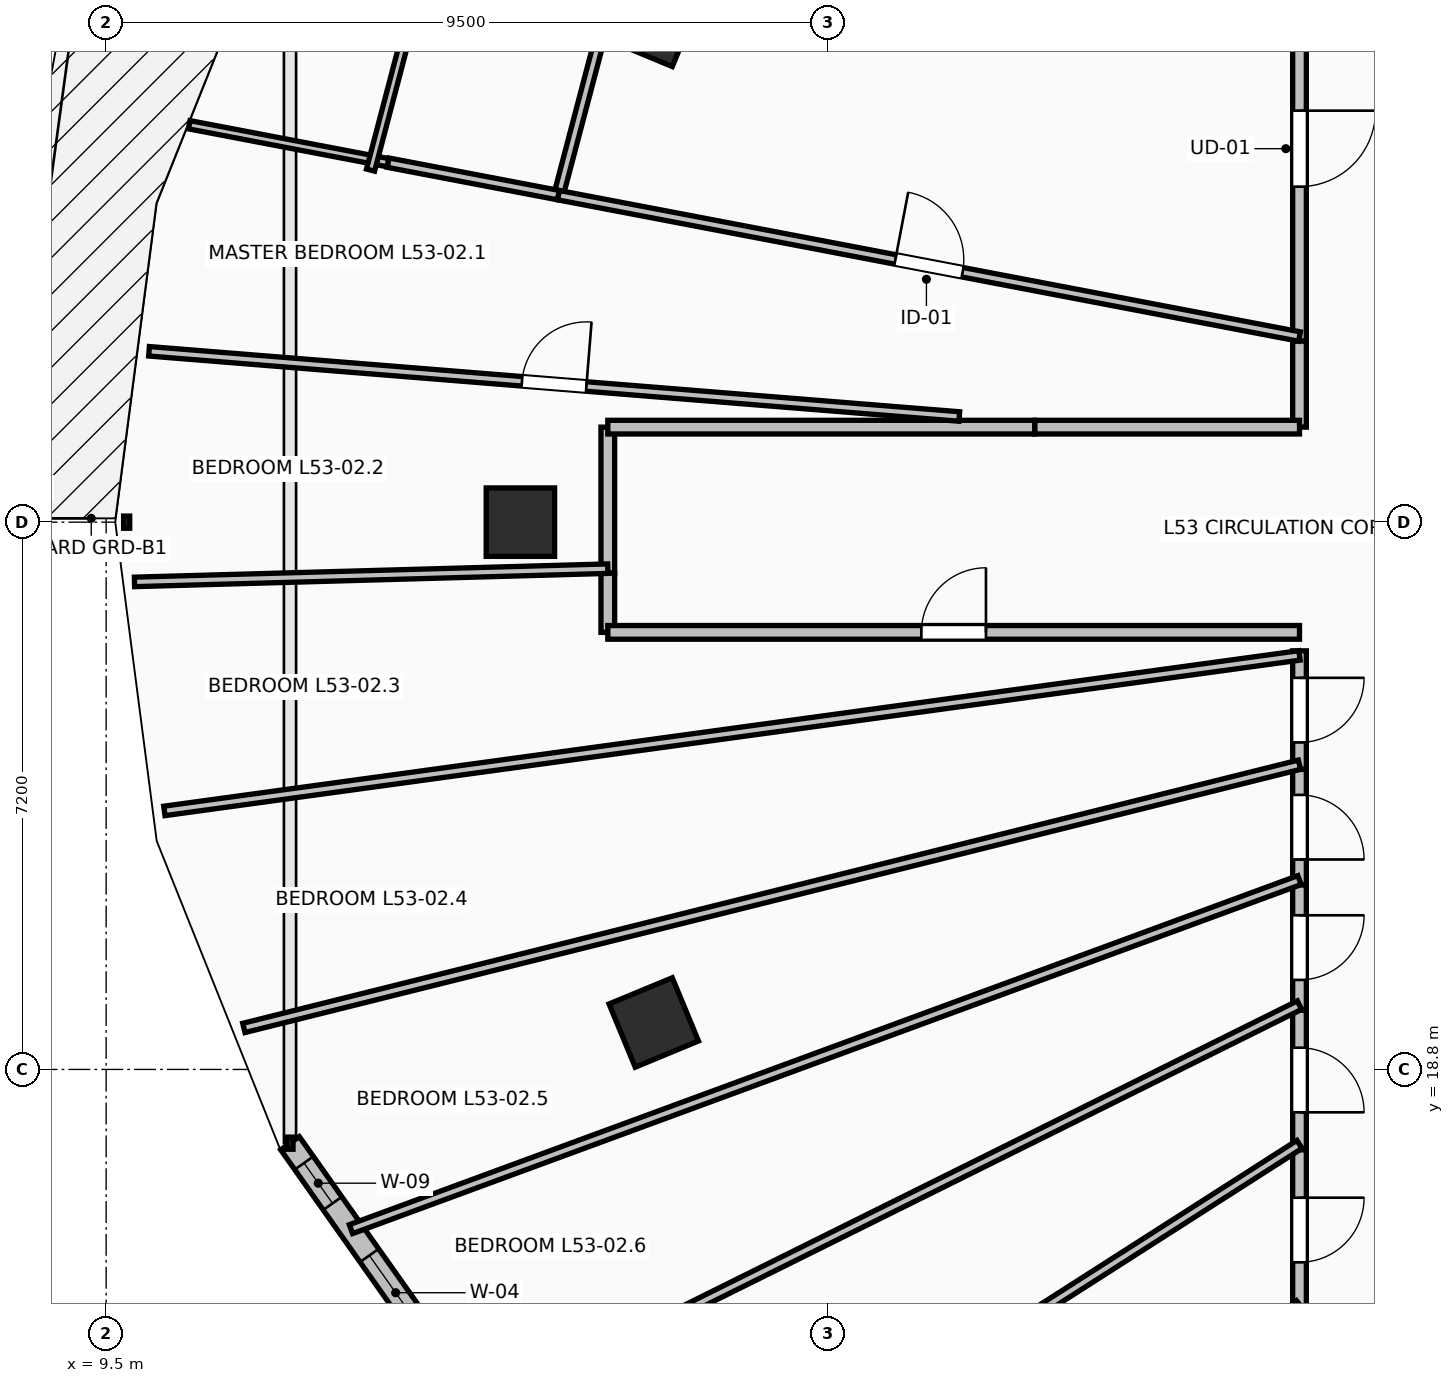
"""IFC4 building model, lengths in metres.
Left out: names, types, materials, properties, quantities, classifications, styles, units other than length and angle.
Written with IfcOpenShell. Run it as: python <this file> out.ifc"""

import sys

from ifc_helpers import new_model, si_unit, direction, frame, frame_2d, origin, origin_2d, place, context, subcontext, project, spatial, rectangle, extrude, element, fill, save


model = new_model("IFC4")
c1 = context("Model", 3, precision=1e-05, world=origin(), true_north=direction((0.0, 1.0)))
c2 = subcontext(c1, "Body", "Model", "MODEL_VIEW")
j1 = project(units=[si_unit("LENGTHUNIT", "METRE"), si_unit("PLANEANGLEUNIT", "RADIAN")], contexts=[c1])
p1 = place(None, origin())
s1 = spatial("IfcSite", under=j1, at=p1, CompositionType="ELEMENT")
p2 = place(p1, origin())
s2 = spatial("IfcBuilding", under=s1, at=p2, CompositionType="ELEMENT")
p3 = place(p2, frame((0.0, 0.0, 196.6)))
s3 = spatial("IfcBuildingStorey", under=s2, at=p3, CompositionType="ELEMENT", Elevation=196.6)
for number, where, z_axis, x_axis in (
    (1, (16.705, 32.582, 0.0), (0.0, 0.0, 1.0), (-0.924, 0.383, 0.0)),
    (2, (14.95, 26.0, 0.0), (0.0, 0.0, 1.0), (-1.0, 0.0, 0.0)),
    (3, (16.705, 19.418, 0.0), (0.0, 0.0, 1.0), (-0.924, -0.383, 0.0)),
):
    element("IfcColumn", number, at=place(p3, frame(where, z_axis=z_axis, x_axis=x_axis)), inside=s3, PredefinedType="COLUMN", context=c2, shape_type="SweptSolid", body=[
        extrude(rectangle(XDim=0.9, YDim=0.9, at=origin_2d()), origin(), (0.0, 0.0, 1.0), 3.5),
    ])
p4 = place(p3, frame((11.919, 17.83, 0.0), z_axis=(0.0, 0.0, 1.0), x_axis=(0.577168747264, -0.81662490605, 0.0)))
e4 = element("IfcWall", 4, at=p4, inside=s3, PredefinedType="STANDARD", context=c2, shape_type="SweptSolid", body=[
    extrude(rectangle(XDim=4.52, YDim=0.3, at=frame_2d((2.26, 0.0))), origin(), (0.0, 0.0, 1.0), 3.24),
])
p5 = place(p4, frame((0.32, 0.0, 0.85)))
e5 = element("IfcOpeningElement", 5, at=p5, cuts=e4, PredefinedType="OPENING", context=c2, shape_type="SweptSolid", body=[
    extrude(rectangle(XDim=0.65, YDim=1.8, at=frame_2d((0.325, 0.9))), frame((0.0, 0.165, 0.0), z_axis=(0.0, -1.0, 0.0), x_axis=(1.0, 0.0, 0.0)), (0.0, 0.0, 1.0), 0.33),
])
p6 = place(p4, frame((1.809, 0.0, 0.85)))
e6 = element("IfcOpeningElement", 6, at=p6, cuts=e4, PredefinedType="OPENING", context=c2, shape_type="SweptSolid", body=[
    extrude(rectangle(XDim=1.2, YDim=1.95, at=frame_2d((0.6, 0.975))), frame((0.0, 0.165, 0.0), z_axis=(0.0, -1.0, 0.0), x_axis=(1.0, 0.0, 0.0)), (0.0, 0.0, 1.0), 0.33),
])
p7 = place(p3, frame((25.2, 33.445, 0.0), z_axis=(0.0, 0.0, 1.0), x_axis=(0.0, -1.0, 0.0)))
e7 = element("IfcWall", 7, at=p7, inside=s3, PredefinedType="PARTITIONING", context=c2, shape_type="SweptSolid", body=[
    extrude(rectangle(XDim=5.063, YDim=0.18, at=frame_2d((2.531, 0.0))), origin(), (0.0, 0.0, 1.0), 2.432),
])
p8 = place(p7, frame((2.031, 0.0, 0.0)))
e8 = element("IfcOpeningElement", 8, at=p8, cuts=e7, PredefinedType="OPENING", context=c2, shape_type="SweptSolid", body=[
    extrude(rectangle(XDim=1.0, YDim=2.15, at=frame_2d((0.5, 1.075))), frame((0.0, 0.105, 0.0), z_axis=(0.0, -1.0, 0.0), x_axis=(1.0, 0.0, 0.0)), (0.0, 0.0, 1.0), 0.21),
])
p9 = place(p3, frame((25.2, 28.382, 0.0), z_axis=(0.0, 0.0, 1.0), x_axis=(0.0, -1.0, 0.0)))
e9 = element("IfcWall", 9, at=p9, inside=s3, PredefinedType="PARTITIONING", context=c2, shape_type="SweptSolid", body=[
    extrude(rectangle(XDim=1.132, YDim=0.18, at=frame_2d((0.566, 0.0))), origin(), (0.0, 0.0, 1.0), 2.432),
])
p10 = place(p3, frame((25.2, 27.25, 0.0), z_axis=(0.0, 0.0, 1.0), x_axis=(-1.0, 0.0, 0.0)))
e10 = element("IfcWall", 10, at=p10, inside=s3, PredefinedType="PARTITIONING", context=c2, shape_type="SweptSolid", body=[
    extrude(rectangle(XDim=3.484, YDim=0.18, at=frame_2d((1.742, 0.0))), origin(), (0.0, 0.0, 1.0), 2.432),
])
p11 = place(p3, frame((16.1, 27.25, 0.0), z_axis=(0.0, 0.0, 1.0), x_axis=(0.0, -1.0, 0.0)))
e11 = element("IfcWall", 11, at=p11, inside=s3, PredefinedType="PARTITIONING", context=c2, shape_type="SweptSolid", body=[
    extrude(rectangle(XDim=1.922, YDim=0.18, at=frame_2d((0.961, 0.0))), origin(), (0.0, 0.0, 1.0), 2.432),
])
p12 = place(p3, frame((21.716, 27.25, 0.0), z_axis=(0.0, 0.0, 1.0), x_axis=(-1.0, 0.0, 0.0)))
e12 = element("IfcWall", 12, at=p12, inside=s3, PredefinedType="PARTITIONING", context=c2, shape_type="SweptSolid", body=[
    extrude(rectangle(XDim=5.616, YDim=0.18, at=frame_2d((2.808, 0.0))), origin(), (0.0, 0.0, 1.0), 2.432),
])
p13 = place(p3, frame((16.1, 25.328, 0.0), z_axis=(0.0, 0.0, 1.0), x_axis=(0.0, -1.0, 0.0)))
e13 = element("IfcWall", 13, at=p13, inside=s3, PredefinedType="PARTITIONING", context=c2, shape_type="SweptSolid", body=[
    extrude(rectangle(XDim=0.778, YDim=0.18, at=frame_2d((0.389, 0.0))), origin(), (0.0, 0.0, 1.0), 3.24),
])
p14 = place(p3, frame((16.1, 24.55, 0.0), z_axis=(0.0, 0.0, 1.0), x_axis=(1.0, 0.0, 0.0)))
e14 = element("IfcWall", 14, at=p14, inside=s3, PredefinedType="PARTITIONING", context=c2, shape_type="SweptSolid", body=[
    extrude(rectangle(XDim=9.1, YDim=0.18, at=frame_2d((4.55, 0.0))), origin(), (0.0, 0.0, 1.0), 2.922),
])
p15 = place(p14, frame((4.125, 0.0, 0.0)))
e15 = element("IfcOpeningElement", 15, at=p15, cuts=e14, PredefinedType="OPENING", context=c2, shape_type="SweptSolid", body=[
    extrude(rectangle(XDim=0.85, YDim=2.1, at=frame_2d((0.425, 1.05))), frame((0.0, 0.105, 0.0), z_axis=(0.0, -1.0, 0.0), x_axis=(1.0, 0.0, 0.0)), (0.0, 0.0, 1.0), 0.21),
])
p16 = place(p3, frame((25.2, 24.307, 0.0), z_axis=(0.0, 0.0, 1.0), x_axis=(0.0, -1.0, 0.0)))
e16 = element("IfcWall", 16, at=p16, inside=s3, PredefinedType="PARTITIONING", context=c2, shape_type="SweptSolid", body=[
    extrude(rectangle(XDim=1.56, YDim=0.18, at=frame_2d((0.78, 0.0))), origin(), (0.0, 0.0, 1.0), 3.24),
])
p17 = place(p16, frame((0.355, 0.0, 0.0)))
e17 = element("IfcOpeningElement", 17, at=p17, cuts=e16, PredefinedType="OPENING", context=c2, shape_type="SweptSolid", body=[
    extrude(rectangle(XDim=0.85, YDim=2.1, at=frame_2d((0.425, 1.05))), frame((0.0, 0.105, 0.0), z_axis=(0.0, -1.0, 0.0), x_axis=(1.0, 0.0, 0.0)), (0.0, 0.0, 1.0), 0.21),
])
p18 = place(p3, frame((25.2, 22.747, 0.0), z_axis=(0.0, 0.0, 1.0), x_axis=(0.0, -1.0, 0.0)))
e18 = element("IfcWall", 18, at=p18, inside=s3, PredefinedType="PARTITIONING", context=c2, shape_type="SweptSolid", body=[
    extrude(rectangle(XDim=1.52, YDim=0.18, at=frame_2d((0.76, 0.0))), origin(), (0.0, 0.0, 1.0), 3.24),
])
p19 = place(p18, frame((0.335, 0.0, 0.0)))
e19 = element("IfcOpeningElement", 19, at=p19, cuts=e18, PredefinedType="OPENING", context=c2, shape_type="SweptSolid", body=[
    extrude(rectangle(XDim=0.85, YDim=2.1, at=frame_2d((0.425, 1.05))), frame((0.0, 0.105, 0.0), z_axis=(0.0, -1.0, 0.0), x_axis=(1.0, 0.0, 0.0)), (0.0, 0.0, 1.0), 0.21),
])
p20 = place(p3, frame((25.2, 21.227, 0.0), z_axis=(0.0, 0.0, 1.0), x_axis=(0.0, -1.0, 0.0)))
e20 = element("IfcWall", 20, at=p20, inside=s3, PredefinedType="PARTITIONING", context=c2, shape_type="SweptSolid", body=[
    extrude(rectangle(XDim=1.648, YDim=0.18, at=frame_2d((0.824, 0.0))), origin(), (0.0, 0.0, 1.0), 3.24),
])
p21 = place(p20, frame((0.399, 0.0, 0.0)))
e21 = element("IfcOpeningElement", 21, at=p21, cuts=e20, PredefinedType="OPENING", context=c2, shape_type="SweptSolid", body=[
    extrude(rectangle(XDim=0.85, YDim=2.1, at=frame_2d((0.425, 1.05))), frame((0.0, 0.105, 0.0), z_axis=(0.0, -1.0, 0.0), x_axis=(1.0, 0.0, 0.0)), (0.0, 0.0, 1.0), 0.21),
])
p22 = place(p3, frame((25.2, 19.579, 0.0), z_axis=(0.0, 0.0, 1.0), x_axis=(0.0, -1.0, 0.0)))
e22 = element("IfcWall", 22, at=p22, inside=s3, PredefinedType="PARTITIONING", context=c2, shape_type="SweptSolid", body=[
    extrude(rectangle(XDim=1.836, YDim=0.18, at=frame_2d((0.918, 0.0))), origin(), (0.0, 0.0, 1.0), 3.24),
])
p23 = place(p22, frame((0.493, 0.0, 0.0)))
e23 = element("IfcOpeningElement", 23, at=p23, cuts=e22, PredefinedType="OPENING", context=c2, shape_type="SweptSolid", body=[
    extrude(rectangle(XDim=0.85, YDim=2.1, at=frame_2d((0.425, 1.05))), frame((0.0, 0.105, 0.0), z_axis=(0.0, -1.0, 0.0), x_axis=(1.0, 0.0, 0.0)), (0.0, 0.0, 1.0), 0.21),
])
p24 = place(p3, frame((25.2, 17.743, 0.0), z_axis=(0.0, 0.0, 1.0), x_axis=(0.0, -1.0, 0.0)))
e24 = element("IfcWall", 24, at=p24, inside=s3, PredefinedType="PARTITIONING", context=c2, shape_type="SweptSolid", body=[
    extrude(rectangle(XDim=2.111, YDim=0.18, at=frame_2d((1.055, 0.0))), origin(), (0.0, 0.0, 1.0), 2.432),
])
p25 = place(p24, frame((0.631, 0.0, 0.0)))
e25 = element("IfcOpeningElement", 25, at=p25, cuts=e24, PredefinedType="OPENING", context=c2, shape_type="SweptSolid", body=[
    extrude(rectangle(XDim=0.85, YDim=2.1, at=frame_2d((0.425, 1.05))), frame((0.0, 0.105, 0.0), z_axis=(0.0, -1.0, 0.0), x_axis=(1.0, 0.0, 0.0)), (0.0, 0.0, 1.0), 0.21),
])
p26 = place(p3, frame((13.21, 30.729, 0.0), z_axis=(0.0, 0.0, 1.0), x_axis=(-0.982266305937, 0.187491077708, 0.0)))
e26 = element("IfcWall", 26, at=p26, inside=s3, PredefinedType="PARTITIONING", context=c2, shape_type="SweptSolid", body=[
    extrude(rectangle(XDim=2.664, YDim=0.11, at=frame_2d((1.332, 0.0))), origin(), (0.0, 0.0, 1.0), 3.24),
])
p27 = place(p3, frame((16.123, 32.853, 0.0), z_axis=(0.0, 0.0, 1.0), x_axis=(-0.254775717765, -0.967000172512, 0.0)))
e27 = element("IfcWall", 27, at=p27, inside=s3, PredefinedType="PARTITIONING", context=c2, shape_type="SweptSolid", body=[
    extrude(rectangle(XDim=2.638, YDim=0.125, at=frame_2d((1.319, 0.0))), origin(), (0.0, 0.0, 1.0), 3.24),
])
p28 = place(p3, frame((15.451, 30.302, 0.0), z_axis=(0.0, 0.0, 1.0), x_axis=(-0.982295439063, 0.187338384738, 0.0)))
e28 = element("IfcWall", 28, at=p28, inside=s3, PredefinedType="PARTITIONING", context=c2, shape_type="SweptSolid", body=[
    extrude(rectangle(XDim=2.281, YDim=0.125, at=frame_2d((1.14, 0.0))), origin(), (0.0, 0.0, 1.0), 3.24),
])
p29 = place(p3, frame((15.451, 30.302, 0.0), z_axis=(0.0, 0.0, 1.0), x_axis=(0.982284698783, -0.187394691859, 0.0)))
e29 = element("IfcWall", 29, at=p29, inside=s3, PredefinedType="PARTITIONING", context=c2, shape_type="SweptSolid", body=[
    extrude(rectangle(XDim=9.925, YDim=0.125, at=frame_2d((4.962, 0.0))), origin(), (0.0, 0.0, 1.0), 2.774),
])
p30 = place(p29, frame((4.512, 0.0, 0.0)))
e30 = element("IfcOpeningElement", 30, at=p30, cuts=e29, PredefinedType="OPENING", context=c2, shape_type="SweptSolid", body=[
    extrude(rectangle(XDim=0.9, YDim=2.1, at=frame_2d((0.45, 1.05))), frame((0.0, 0.077, 0.0), z_axis=(0.0, -1.0, 0.0), x_axis=(1.0, 0.0, 0.0)), (0.0, 0.0, 1.0), 0.155),
])
p31 = place(p3, frame((12.979, 30.632, 0.0), z_axis=(0.0, 0.0, 1.0), x_axis=(0.254121849718, 0.967172210879, 0.0)))
e31 = element("IfcWall", 31, at=p31, inside=s3, PredefinedType="PARTITIONING", context=c2, shape_type="SweptSolid", body=[
    extrude(rectangle(XDim=3.203, YDim=0.11, at=frame_2d((1.602, 0.0))), origin(), (0.0, 0.0, 1.0), 3.24),
])
p32 = place(p3, frame((10.064, 28.248, 0.0), z_axis=(0.0, 0.0, 1.0), x_axis=(0.996775744362, -0.080237867939, 0.0)))
e32 = element("IfcWall", 32, at=p32, inside=s3, PredefinedType="PARTITIONING", context=c2, shape_type="SweptSolid", body=[
    extrude(rectangle(XDim=10.695, YDim=0.125, at=frame_2d((5.348, 0.0))), origin(), (0.0, 0.0, 1.0), 2.774),
])
p33 = place(p32, frame((4.923, 0.0, 0.0)))
e33 = element("IfcOpeningElement", 33, at=p33, cuts=e32, PredefinedType="OPENING", context=c2, shape_type="SweptSolid", body=[
    extrude(rectangle(XDim=0.85, YDim=2.1, at=frame_2d((0.425, 1.05))), frame((0.0, 0.077, 0.0), z_axis=(0.0, -1.0, 0.0), x_axis=(1.0, 0.0, 0.0)), (0.0, 0.0, 1.0), 0.155),
])
p34 = place(p3, frame((9.873, 25.214, 0.0), z_axis=(0.0, 0.0, 1.0), x_axis=(0.999610603939, 0.027904130401, 0.0)))
e34 = element("IfcWall", 34, at=p34, inside=s3, PredefinedType="PARTITIONING", context=c2, shape_type="SweptSolid", body=[
    extrude(rectangle(XDim=6.229, YDim=0.125, at=frame_2d((3.115, 0.0))), origin(), (0.0, 0.0, 1.0), 2.774),
])
p35 = place(p3, frame((10.266, 22.201, 0.0), z_axis=(0.0, 0.0, 1.0), x_axis=(0.990743725495, 0.135745609106, 0.0)))
e35 = element("IfcWall", 35, at=p35, inside=s3, PredefinedType="PARTITIONING", context=c2, shape_type="SweptSolid", body=[
    extrude(rectangle(XDim=15.073, YDim=0.125, at=frame_2d((7.537, 0.0))), origin(), (0.0, 0.0, 1.0), 2.774),
])
p36 = place(p3, frame((11.312, 19.346, 0.0), z_axis=(0.0, 0.0, 1.0), x_axis=(0.970287811835, 0.241953636475, 0.0)))
e36 = element("IfcWall", 36, at=p36, inside=s3, PredefinedType="PARTITIONING", context=c2, shape_type="SweptSolid", body=[
    extrude(rectangle(XDim=14.313, YDim=0.125, at=frame_2d((7.157, 0.0))), origin(), (0.0, 0.0, 1.0), 2.774),
])
p37 = place(p3, frame((12.721, 16.699, 0.0), z_axis=(0.0, 0.0, 1.0), x_axis=(0.938476898763, 0.34534201958, 0.0)))
e37 = element("IfcWall", 37, at=p37, inside=s3, PredefinedType="PARTITIONING", context=c2, shape_type="SweptSolid", body=[
    extrude(rectangle(XDim=13.297, YDim=0.125, at=frame_2d((6.648, 0.0))), origin(), (0.0, 0.0, 1.0), 2.432),
])
p38 = place(p3, frame((14.418, 14.294, 0.0), z_axis=(0.0, 0.0, 1.0), x_axis=(0.895717443483, 0.444623730182, 0.0)))
e38 = element("IfcWall", 38, at=p38, inside=s3, PredefinedType="PARTITIONING", context=c2, shape_type="SweptSolid", body=[
    extrude(rectangle(XDim=12.037, YDim=0.125, at=frame_2d((6.019, 0.0))), origin(), (0.0, 0.0, 1.0), 2.432),
])
p39 = place(p3, frame((16.547, 12.28, 0.0), z_axis=(0.0, 0.0, 1.0), x_axis=(0.842442736758, 0.53878589002, 0.0)))
e39 = element("IfcWall", 39, at=p39, inside=s3, PredefinedType="PARTITIONING", context=c2, shape_type="SweptSolid", body=[
    extrude(rectangle(XDim=10.271, YDim=0.125, at=frame_2d((5.136, 0.0))), origin(), (0.0, 0.0, 1.0), 2.432),
])
p40 = place(p3, frame((18.71, 10.49, 0.0), z_axis=(0.0, 0.0, 1.0), x_axis=(0.779284718529, 0.626670030771, 0.0)))
e40 = element("IfcWall", 40, at=p40, inside=s3, PredefinedType="PARTITIONING", context=c2, shape_type="SweptSolid", body=[
    extrude(rectangle(XDim=8.328, YDim=0.125, at=frame_2d((4.164, 0.0))), origin(), (0.0, 0.0, 1.0), 2.432),
])
p41 = place(p40, frame((2.899, 0.0, 0.0)))
e41 = element("IfcOpeningElement", 41, at=p41, cuts=e40, PredefinedType="OPENING", context=c2, shape_type="SweptSolid", body=[
    extrude(rectangle(XDim=0.85, YDim=2.1, at=frame_2d((0.425, 1.05))), frame((0.0, 0.077, 0.0), z_axis=(0.0, -1.0, 0.0), x_axis=(1.0, 0.0, 0.0)), (0.0, 0.0, 1.0), 0.155),
])
p42 = place(p5, origin())
e42 = element("IfcWindow", 42, at=p42, inside=s3, PartitioningType="SINGLE_PANEL", PredefinedType="WINDOW", context=c2, shape_type="SweptSolid", body=[
    extrude(rectangle(XDim=0.65, YDim=1.8, at=frame_2d((0.325, 0.9))), frame((0.0, 0.03, 0.0), z_axis=(0.0, -1.0, 0.0), x_axis=(1.0, 0.0, 0.0)), (0.0, 0.0, 1.0), 0.06),
])
fill(e5, e42)
p43 = place(p6, origin())
e43 = element("IfcWindow", 43, at=p43, inside=s3, PartitioningType="SINGLE_PANEL", PredefinedType="WINDOW", context=c2, shape_type="SweptSolid", body=[
    extrude(rectangle(XDim=1.2, YDim=1.95, at=frame_2d((0.6, 0.975))), frame((0.0, 0.03, 0.0), z_axis=(0.0, -1.0, 0.0), x_axis=(1.0, 0.0, 0.0)), (0.0, 0.0, 1.0), 0.06),
])
fill(e6, e43)
p44 = place(p8, origin())
e44 = element("IfcDoor", 44, at=p44, inside=s3, OperationType="SINGLE_SWING_LEFT", PredefinedType="DOOR", context=c2, shape_type="SweptSolid", body=[
    extrude(rectangle(XDim=1.0, YDim=2.15, at=frame_2d((0.5, 1.075))), frame((0.0, 0.025, 0.0), z_axis=(0.0, -1.0, 0.0), x_axis=(1.0, 0.0, 0.0)), (0.0, 0.0, 1.0), 0.05),
])
fill(e8, e44)
p45 = place(p30, origin())
e45 = element("IfcDoor", 45, at=p45, inside=s3, OperationType="SINGLE_SWING_LEFT", PredefinedType="DOOR", context=c2, shape_type="SweptSolid", body=[
    extrude(rectangle(XDim=0.9, YDim=2.1, at=frame_2d((0.45, 1.05))), frame((0.0, 0.025, 0.0), z_axis=(0.0, -1.0, 0.0), x_axis=(1.0, 0.0, 0.0)), (0.0, 0.0, 1.0), 0.05),
])
fill(e30, e45)
p46 = place(p15, origin())
e46 = element("IfcDoor", 46, at=p46, inside=s3, OperationType="SINGLE_SWING_RIGHT", PredefinedType="DOOR", context=c2, shape_type="SweptSolid", body=[
    extrude(rectangle(XDim=0.85, YDim=2.1, at=frame_2d((0.425, 1.05))), frame((0.0, 0.025, 0.0), z_axis=(0.0, -1.0, 0.0), x_axis=(1.0, 0.0, 0.0)), (0.0, 0.0, 1.0), 0.05),
])
fill(e15, e46)
p47 = place(p17, origin())
e47 = element("IfcDoor", 47, at=p47, inside=s3, OperationType="SINGLE_SWING_LEFT", PredefinedType="DOOR", context=c2, shape_type="SweptSolid", body=[
    extrude(rectangle(XDim=0.85, YDim=2.1, at=frame_2d((0.425, 1.05))), frame((0.0, 0.025, 0.0), z_axis=(0.0, -1.0, 0.0), x_axis=(1.0, 0.0, 0.0)), (0.0, 0.0, 1.0), 0.05),
])
fill(e17, e47)
p48 = place(p19, origin())
e48 = element("IfcDoor", 48, at=p48, inside=s3, OperationType="SINGLE_SWING_RIGHT", PredefinedType="DOOR", context=c2, shape_type="SweptSolid", body=[
    extrude(rectangle(XDim=0.85, YDim=2.1, at=frame_2d((0.425, 1.05))), frame((0.0, 0.025, 0.0), z_axis=(0.0, -1.0, 0.0), x_axis=(1.0, 0.0, 0.0)), (0.0, 0.0, 1.0), 0.05),
])
fill(e19, e48)
p49 = place(p21, origin())
e49 = element("IfcDoor", 49, at=p49, inside=s3, OperationType="SINGLE_SWING_LEFT", PredefinedType="DOOR", context=c2, shape_type="SweptSolid", body=[
    extrude(rectangle(XDim=0.85, YDim=2.1, at=frame_2d((0.425, 1.05))), frame((0.0, 0.025, 0.0), z_axis=(0.0, -1.0, 0.0), x_axis=(1.0, 0.0, 0.0)), (0.0, 0.0, 1.0), 0.05),
])
fill(e21, e49)
p50 = place(p23, origin())
e50 = element("IfcDoor", 50, at=p50, inside=s3, OperationType="SINGLE_SWING_RIGHT", PredefinedType="DOOR", context=c2, shape_type="SweptSolid", body=[
    extrude(rectangle(XDim=0.85, YDim=2.1, at=frame_2d((0.425, 1.05))), frame((0.0, 0.025, 0.0), z_axis=(0.0, -1.0, 0.0), x_axis=(1.0, 0.0, 0.0)), (0.0, 0.0, 1.0), 0.05),
])
fill(e23, e50)
p51 = place(p25, origin())
e51 = element("IfcDoor", 51, at=p51, inside=s3, OperationType="SINGLE_SWING_LEFT", PredefinedType="DOOR", context=c2, shape_type="SweptSolid", body=[
    extrude(rectangle(XDim=0.85, YDim=2.1, at=frame_2d((0.425, 1.05))), frame((0.0, 0.025, 0.0), z_axis=(0.0, -1.0, 0.0), x_axis=(1.0, 0.0, 0.0)), (0.0, 0.0, 1.0), 0.05),
])
fill(e25, e51)
p52 = place(p33, origin())
e52 = element("IfcDoor", 52, at=p52, inside=s3, OperationType="SINGLE_SWING_RIGHT", PredefinedType="DOOR", context=c2, shape_type="SweptSolid", body=[
    extrude(rectangle(XDim=0.85, YDim=2.1, at=frame_2d((0.425, 1.05))), frame((0.0, 0.025, 0.0), z_axis=(0.0, -1.0, 0.0), x_axis=(1.0, 0.0, 0.0)), (0.0, 0.0, 1.0), 0.05),
])
fill(e33, e52)
save(model, sys.argv[1])
